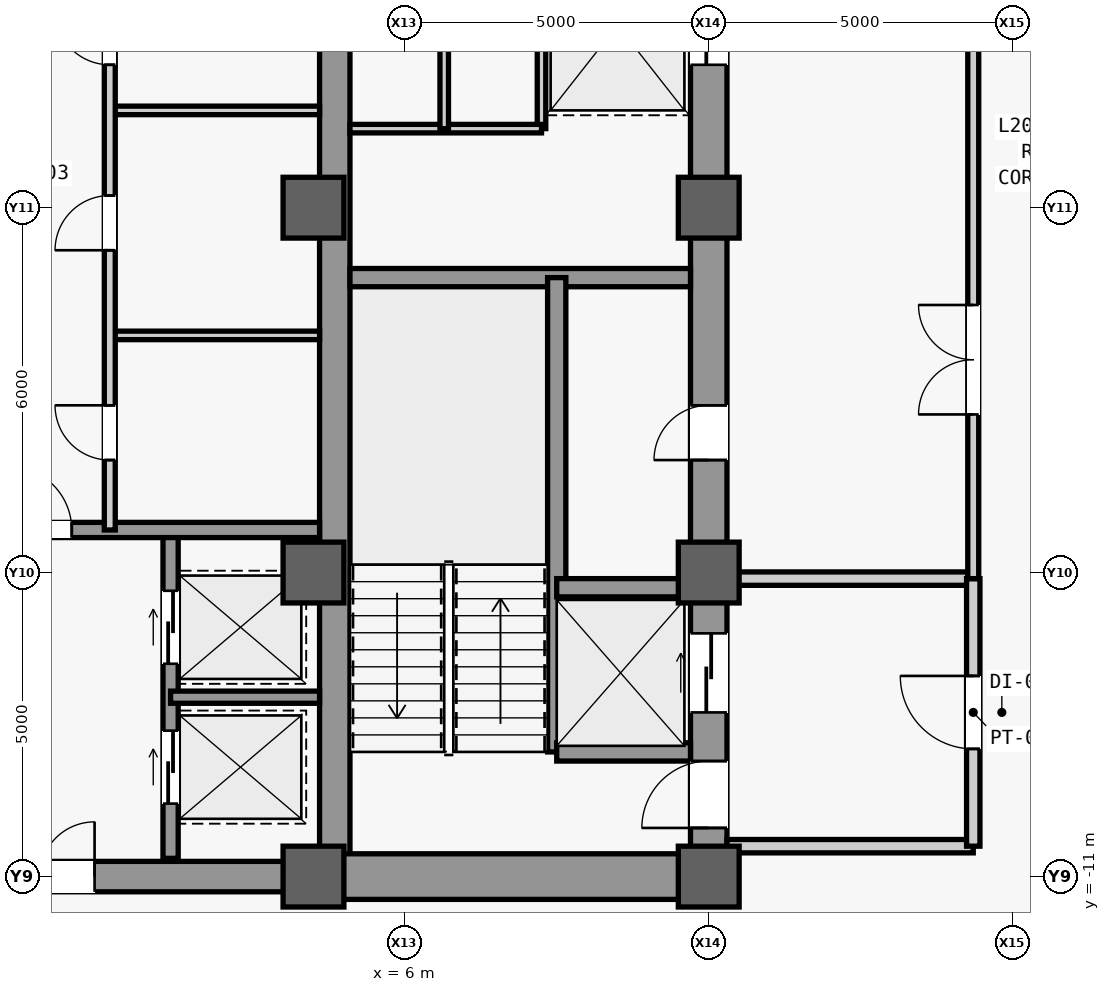
"""IFC4 building model, lengths in metres.
Left out: names, types, materials, properties, quantities, classifications, styles, units other than length and angle.
Written with IfcOpenShell. Run it as: python <this file> out.ifc"""

import sys

from ifc_helpers import new_model, si_unit, direction, frame, frame_2d, origin, origin_2d, place, context, subcontext, project, spatial, rectangle, extrude, source, transform, mapped, element, fill, save


model = new_model("IFC4")
c1 = context("Model", 3, precision=1e-05, world=origin(), true_north=direction((0.0, 1.0)))
c2 = subcontext(c1, "Body", "Model", "MODEL_VIEW")
j1 = project(units=[si_unit("LENGTHUNIT", "METRE"), si_unit("PLANEANGLEUNIT", "RADIAN")], contexts=[c1])
p1 = place(None, origin())
s1 = spatial("IfcSite", under=j1, at=p1, CompositionType="ELEMENT")
p2 = place(p1, origin())
s2 = spatial("IfcBuilding", under=s1, at=p2, CompositionType="ELEMENT")
p3 = place(p2, frame((0.0, 0.0, 91.4)))
s3 = spatial("IfcBuildingStorey", under=s2, at=p3, CompositionType="ELEMENT", Elevation=91.4)
m1 = source(origin(), c2, "Body", "SweptSolid", [
    extrude(rectangle(XDim=22.0, YDim=0.6, at=frame_2d((11.0, 0.0))), origin(), (0.0, 0.0, 1.0), 3.84),
])
p4 = place(p3, frame((11.0, -11.0, 0.0), z_axis=(0.0, 0.0, 1.0), x_axis=(0.0, 1.0, 0.0)))
e1 = element("IfcWall", 1, at=p4, inside=s3, PredefinedType="SHEAR", context=c2, shape_type="MappedRepresentation", body=[
    mapped(m1, transform((0.0, 0.0, 0.0), scale=1.0)),
])
m2 = source(origin(), c2, "Body", "SweptSolid", [
    extrude(rectangle(XDim=1.1, YDim=2.2, at=frame_2d((0.55, 1.1))), frame((0.0, 0.31, 0.0), z_axis=(0.0, -1.0, 0.0), x_axis=(1.0, 0.0, 0.0)), (0.0, 0.0, 1.0), 0.62),
])
p5 = place(p4, frame((0.8, 0.0, 0.0)))
e2 = element("IfcOpeningElement", 2, at=p5, cuts=e1, PredefinedType="OPENING", context=c2, shape_type="MappedRepresentation", body=[
    mapped(m2, transform((0.0, 0.0, 0.0), scale=1.0)),
])
m3 = source(origin(), c2, "Body", "SweptSolid", [
    extrude(rectangle(XDim=0.9, YDim=2.15, at=frame_2d((0.45, 1.075))), frame((0.0, 0.31, 0.0), z_axis=(0.0, -1.0, 0.0), x_axis=(1.0, 0.0, 0.0)), (0.0, 0.0, 1.0), 0.62),
])
p6 = place(p4, frame((6.85, 0.0, 0.0)))
e3 = element("IfcOpeningElement", 3, at=p6, cuts=e1, PredefinedType="OPENING", context=c2, shape_type="MappedRepresentation", body=[
    mapped(m3, transform((0.0, 0.0, 0.0), scale=1.0)),
])
m4 = source(origin(), c2, "Body", "SweptSolid", [
    extrude(rectangle(XDim=1.3, YDim=2.3, at=frame_2d((0.65, 1.15))), frame((0.0, 0.31, 0.0), z_axis=(0.0, -1.0, 0.0), x_axis=(1.0, 0.0, 0.0)), (0.0, 0.0, 1.0), 0.62),
])
p7 = place(p4, frame((2.7, 0.0, 0.0)))
e4 = element("IfcOpeningElement", 4, at=p7, cuts=e1, PredefinedType="OPENING", context=c2, shape_type="MappedRepresentation", body=[
    mapped(m4, transform((0.0, 0.0, 0.0), scale=1.0)),
])
p8 = place(p4, frame((13.35, 0.0, 0.0)))
e5 = element("IfcOpeningElement", 5, at=p8, cuts=e1, PredefinedType="OPENING", context=c2, shape_type="MappedRepresentation", body=[
    mapped(m4, transform((0.0, 0.0, 0.0), scale=1.0)),
])
m5 = source(origin(), c2, "Body", "SweptSolid", [
    extrude(rectangle(XDim=21.4, YDim=0.5, at=frame_2d((10.7, 0.0))), origin(), (0.0, 0.0, 1.0), 3.84),
])
p9 = place(p3, frame((4.85, -10.7, 0.0), z_axis=(0.0, 0.0, 1.0), x_axis=(0.0, 1.0, 0.0)))
e6 = element("IfcWall", 6, at=p9, inside=s3, PredefinedType="SHEAR", context=c2, shape_type="MappedRepresentation", body=[
    mapped(m5, transform((0.0, 0.0, 0.0), scale=1.0)),
])
m6 = source(origin(), c2, "Body", "SweptSolid", [
    extrude(rectangle(XDim=5.85, YDim=0.75, at=frame_2d((2.925, 0.0))), origin(), (0.0, 0.0, 1.0), 3.84),
])
p10 = place(p3, frame((4.85, -11.0, 0.0), z_axis=(0.0, 0.0, 1.0), x_axis=(1.0, 0.0, 0.0)))
e7 = element("IfcWall", 7, at=p10, inside=s3, PredefinedType="SHEAR", context=c2, shape_type="MappedRepresentation", body=[
    mapped(m6, transform((0.0, 0.0, 0.0), scale=1.0)),
])
m7 = source(origin(), c2, "Body", "SweptSolid", [
    extrude(rectangle(XDim=5.6, YDim=0.3, at=frame_2d((2.8, 0.0))), origin(), (0.0, 0.0, 1.0), 3.84),
])
p11 = place(p3, frame((5.1, -1.15, 0.0), z_axis=(0.0, 0.0, 1.0), x_axis=(1.0, 0.0, 0.0)))
e8 = element("IfcWall", 8, at=p11, inside=s3, PredefinedType="SHEAR", context=c2, shape_type="MappedRepresentation", body=[
    mapped(m7, transform((0.0, 0.0, 0.0), scale=1.0)),
])
m8 = source(origin(), c2, "Body", "SweptSolid", [
    extrude(rectangle(XDim=9.2, YDim=0.5, at=frame_2d((4.6, 0.0))), origin(), (0.0, 0.0, 1.0), 3.84),
])
p12 = place(p3, frame((-4.6, -11.0, 0.0), z_axis=(0.0, 0.0, 1.0), x_axis=(1.0, 0.0, 0.0)))
e9 = element("IfcWall", 9, at=p12, inside=s3, PredefinedType="SHEAR", context=c2, shape_type="MappedRepresentation", body=[
    mapped(m8, transform((0.0, 0.0, 0.0), scale=1.0)),
])
m9 = source(origin(), c2, "Body", "SweptSolid", [
    extrude(rectangle(XDim=1.8, YDim=2.25, at=frame_2d((0.9, 1.125))), frame((0.0, 0.26, 0.0), z_axis=(0.0, -1.0, 0.0), x_axis=(1.0, 0.0, 0.0)), (0.0, 0.0, 1.0), 0.52),
])
p13 = place(p12, frame((3.7, 0.0, 0.0)))
e10 = element("IfcOpeningElement", 10, at=p13, cuts=e9, PredefinedType="OPENING", context=c2, shape_type="MappedRepresentation", body=[
    mapped(m9, transform((0.0, 0.0, 0.0), scale=1.0)),
])
m10 = source(origin(), c2, "Body", "SweptSolid", [
    extrude(rectangle(XDim=1.0, YDim=1.0, at=origin_2d()), origin(), (0.0, 0.0, 1.0), 4.1),
])
for number, where, z_axis, x_axis in (
    (11, (4.5, -11.0, 0.0), (0.0, 0.0, 1.0), (1.0, 0.0, 0.0)),
    (12, (4.5, -6.0, 0.0), (0.0, 0.0, 1.0), (1.0, 0.0, 0.0)),
    (13, (4.5, 0.0, 0.0), (0.0, 0.0, 1.0), (1.0, 0.0, 0.0)),
    (14, (11.0, -11.0, 0.0), (0.0, 0.0, 1.0), (1.0, 0.0, 0.0)),
    (15, (11.0, -6.0, 0.0), (0.0, 0.0, 1.0), (1.0, 0.0, 0.0)),
    (16, (11.0, 0.0, 0.0), (0.0, 0.0, 1.0), (1.0, 0.0, 0.0)),
):
    element("IfcColumn", number, at=place(p3, frame(where, z_axis=z_axis, x_axis=x_axis)), inside=s3, PredefinedType="COLUMN", context=c2, shape_type="MappedRepresentation", body=[
        mapped(m10, transform((0.0, 0.0, 0.0), scale=1.0)),
    ])
m11 = source(origin(), c2, "Body", "SweptSolid", [
    extrude(rectangle(XDim=7.8, YDim=0.3, at=frame_2d((3.9, 0.0))), origin(), (0.0, 0.0, 1.0), 3.84),
])
p14 = place(p3, frame((8.5, -8.95, 0.0), z_axis=(0.0, 0.0, 1.0), x_axis=(0.0, 1.0, 0.0)))
e17 = element("IfcWall", 17, at=p14, inside=s3, PredefinedType="SHEAR", context=c2, shape_type="MappedRepresentation", body=[
    mapped(m11, transform((0.0, 0.0, 0.0), scale=1.0)),
])
m12 = source(origin(), c2, "Body", "SweptSolid", [
    extrude(rectangle(XDim=2.2, YDim=0.3, at=frame_2d((1.1, 0.0))), origin(), (0.0, 0.0, 1.0), 3.84),
])
for number, where, z_axis, x_axis in (
    (18, (8.5, -8.95, 0.0), (0.0, 0.0, 1.0), (1.0, 0.0, 0.0)),
    (19, (8.5, -6.25, 0.0), (0.0, 0.0, 1.0), (1.0, 0.0, 0.0)),
):
    element("IfcWall", number, at=place(p3, frame(where, z_axis=z_axis, x_axis=x_axis)), inside=s3, PredefinedType="SHEAR", context=c2, shape_type="MappedRepresentation", body=[
        mapped(m12, transform((0.0, 0.0, 0.0), scale=1.0)),
    ])
m13 = source(origin(), c2, "Body", "SweptSolid", [
    extrude(rectangle(XDim=9.4, YDim=0.14, at=frame_2d((4.7, 0.0))), origin(), (0.0, 0.0, 1.0), 3.84),
])
p15 = place(p3, frame((8.25, 1.3, 0.0), z_axis=(0.0, 0.0, 1.0), x_axis=(0.0, 1.0, 0.0)))
e20 = element("IfcWall", 20, at=p15, inside=s3, PredefinedType="PARTITIONING", context=c2, shape_type="MappedRepresentation", body=[
    mapped(m13, transform((0.0, 0.0, 0.0), scale=1.0)),
])
m14 = source(origin(), c2, "Body", "SweptSolid", [
    extrude(rectangle(XDim=3.15, YDim=0.14, at=frame_2d((1.575, 0.0))), origin(), (0.0, 0.0, 1.0), 3.84),
])
p16 = place(p3, frame((5.1, 1.3, 0.0), z_axis=(0.0, 0.0, 1.0), x_axis=(1.0, 0.0, 0.0)))
e21 = element("IfcWall", 21, at=p16, inside=s3, PredefinedType="PARTITIONING", context=c2, shape_type="MappedRepresentation", body=[
    mapped(m14, transform((0.0, 0.0, 0.0), scale=1.0)),
])
m15 = source(origin(), c2, "Body", "SweptSolid", [
    extrude(rectangle(XDim=7.1, YDim=0.14, at=frame_2d((3.55, 0.0))), origin(), (0.0, 0.0, 1.0), 3.84),
])
p17 = place(p3, frame((6.65, 1.3, 0.0), z_axis=(0.0, 0.0, 1.0), x_axis=(0.0, 1.0, 0.0)))
e22 = element("IfcWall", 22, at=p17, inside=s3, PredefinedType="PARTITIONING", context=c2, shape_type="MappedRepresentation", body=[
    mapped(m15, transform((0.0, 0.0, 0.0), scale=1.0)),
])
m16 = source(origin(), c2, "Body", "SweptSolid", [
    extrude(rectangle(XDim=0.9, YDim=2.15, at=frame_2d((0.45, 1.075))), frame((0.0, 0.08, 0.0), z_axis=(0.0, -1.0, 0.0), x_axis=(1.0, 0.0, 0.0)), (0.0, 0.0, 1.0), 0.16),
])
p18 = place(p17, frame((1.3, 0.0, 0.0)))
e23 = element("IfcOpeningElement", 23, at=p18, cuts=e22, PredefinedType="OPENING", context=c2, shape_type="MappedRepresentation", body=[
    mapped(m16, transform((0.0, 0.0, 0.0), scale=1.0)),
])
m17 = source(origin(), c2, "Body", "SweptSolid", [
    extrude(rectangle(XDim=4.05, YDim=0.22, at=frame_2d((2.025, 0.0))), origin(), (0.0, 0.0, 1.0), 3.84),
])
p19 = place(p3, frame((11.3, -10.5, 0.0), z_axis=(0.0, 0.0, 1.0), x_axis=(1.0, 0.0, 0.0)))
e24 = element("IfcWall", 24, at=p19, inside=s3, PredefinedType="PARTITIONING", context=c2, shape_type="MappedRepresentation", body=[
    mapped(m17, transform((0.0, 0.0, 0.0), scale=1.0)),
])
m18 = source(origin(), c2, "Body", "SweptSolid", [
    extrude(rectangle(XDim=4.05, YDim=0.22, at=frame_2d((2.025, 0.0))), origin(), (0.0, 0.0, 1.0), 3.067),
])
p20 = place(p3, frame((11.3, -6.1, 0.0), z_axis=(0.0, 0.0, 1.0), x_axis=(1.0, 0.0, 0.0)))
e25 = element("IfcWall", 25, at=p20, inside=s3, PredefinedType="PARTITIONING", context=c2, shape_type="MappedRepresentation", body=[
    mapped(m18, transform((0.0, 0.0, 0.0), scale=1.0)),
])
m19 = source(origin(), c2, "Body", "SweptSolid", [
    extrude(rectangle(XDim=4.4, YDim=0.22, at=frame_2d((2.2, 0.0))), origin(), (0.0, 0.0, 1.0), 3.84),
])
p21 = place(p3, frame((15.35, -10.5, 0.0), z_axis=(0.0, 0.0, 1.0), x_axis=(0.0, 1.0, 0.0)))
e26 = element("IfcWall", 26, at=p21, inside=s3, PredefinedType="PARTITIONING", context=c2, shape_type="MappedRepresentation", body=[
    mapped(m19, transform((0.0, 0.0, 0.0), scale=1.0)),
])
m20 = source(origin(), c2, "Body", "SweptSolid", [
    extrude(rectangle(XDim=1.2, YDim=2.2, at=frame_2d((0.6, 1.1))), frame((0.0, 0.12, 0.0), z_axis=(0.0, -1.0, 0.0), x_axis=(1.0, 0.0, 0.0)), (0.0, 0.0, 1.0), 0.24),
])
p22 = place(p21, frame((1.6, 0.0, 0.0)))
e27 = element("IfcOpeningElement", 27, at=p22, cuts=e26, PredefinedType="OPENING", context=c2, shape_type="MappedRepresentation", body=[
    mapped(m20, transform((0.0, 0.0, 0.0), scale=1.0)),
])
m21 = source(origin(), c2, "Body", "SweptSolid", [
    extrude(rectangle(XDim=16.6, YDim=0.18, at=frame_2d((8.3, 0.0))), origin(), (0.0, 0.0, 1.0), 3.84),
])
p23 = place(p3, frame((15.35, -6.1, 0.0), z_axis=(0.0, 0.0, 1.0), x_axis=(0.0, 1.0, 0.0)))
e28 = element("IfcWall", 28, at=p23, inside=s3, PredefinedType="PARTITIONING", context=c2, shape_type="MappedRepresentation", body=[
    mapped(m21, transform((0.0, 0.0, 0.0), scale=1.0)),
])
m22 = source(origin(), c2, "Body", "SweptSolid", [
    extrude(rectangle(XDim=1.8, YDim=2.25, at=frame_2d((0.9, 1.125))), frame((0.0, 0.1, 0.0), z_axis=(0.0, -1.0, 0.0), x_axis=(1.0, 0.0, 0.0)), (0.0, 0.0, 1.0), 0.2),
])
p24 = place(p23, frame((2.7, 0.0, 0.0)))
e29 = element("IfcOpeningElement", 29, at=p24, cuts=e28, PredefinedType="OPENING", context=c2, shape_type="MappedRepresentation", body=[
    mapped(m22, transform((0.0, 0.0, 0.0), scale=1.0)),
])
p25 = place(p23, frame((13.0, 0.0, 0.0)))
e30 = element("IfcOpeningElement", 30, at=p25, cuts=e28, PredefinedType="OPENING", context=c2, shape_type="MappedRepresentation", body=[
    mapped(m22, transform((0.0, 0.0, 0.0), scale=1.0)),
])
m23 = source(origin(), c2, "Body", "SweptSolid", [
    extrude(rectangle(XDim=5.4, YDim=0.25, at=frame_2d((2.7, 0.0))), origin(), (0.0, 0.0, 1.0), 3.84),
])
p26 = place(p3, frame((2.15, -10.7, 0.0), z_axis=(0.0, 0.0, 1.0), x_axis=(0.0, 1.0, 0.0)))
e31 = element("IfcWall", 31, at=p26, inside=s3, PredefinedType="SHEAR", context=c2, shape_type="MappedRepresentation", body=[
    mapped(m23, transform((0.0, 0.0, 0.0), scale=1.0)),
])
m24 = source(origin(), c2, "Body", "SweptSolid", [
    extrude(rectangle(XDim=1.2, YDim=2.3, at=frame_2d((0.6, 1.15))), frame((0.0, 0.135, 0.0), z_axis=(0.0, -1.0, 0.0), x_axis=(1.0, 0.0, 0.0)), (0.0, 0.0, 1.0), 0.27),
])
p27 = place(p26, frame((0.9, 0.0, 0.0)))
e32 = element("IfcOpeningElement", 32, at=p27, cuts=e31, PredefinedType="OPENING", context=c2, shape_type="MappedRepresentation", body=[
    mapped(m24, transform((0.0, 0.0, 0.0), scale=1.0)),
])
p28 = place(p26, frame((3.2, 0.0, 0.0)))
e33 = element("IfcOpeningElement", 33, at=p28, cuts=e31, PredefinedType="OPENING", context=c2, shape_type="MappedRepresentation", body=[
    mapped(m24, transform((0.0, 0.0, 0.0), scale=1.0)),
])
m25 = source(origin(), c2, "Body", "SweptSolid", [
    extrude(rectangle(XDim=2.45, YDim=0.2, at=frame_2d((1.225, 0.0))), origin(), (0.0, 0.0, 1.0), 3.84),
])
p29 = place(p3, frame((2.15, -8.05, 0.0), z_axis=(0.0, 0.0, 1.0), x_axis=(1.0, 0.0, 0.0)))
e34 = element("IfcWall", 34, at=p29, inside=s3, PredefinedType="SHEAR", context=c2, shape_type="MappedRepresentation", body=[
    mapped(m25, transform((0.0, 0.0, 0.0), scale=1.0)),
])
m26 = source(origin(), c2, "Body", "SweptSolid", [
    extrude(rectangle(XDim=9.2, YDim=0.25, at=frame_2d((4.6, 0.0))), origin(), (0.0, 0.0, 1.0), 3.84),
])
p30 = place(p3, frame((-4.6, -5.3, 0.0), z_axis=(0.0, 0.0, 1.0), x_axis=(1.0, 0.0, 0.0)))
e35 = element("IfcWall", 35, at=p30, inside=s3, PredefinedType="SHEAR", context=c2, shape_type="MappedRepresentation", body=[
    mapped(m26, transform((0.0, 0.0, 0.0), scale=1.0)),
])
m27 = source(origin(), c2, "Body", "SweptSolid", [
    extrude(rectangle(XDim=1.05, YDim=2.2, at=frame_2d((0.525, 1.1))), frame((0.0, 0.135, 0.0), z_axis=(0.0, -1.0, 0.0), x_axis=(1.0, 0.0, 0.0)), (0.0, 0.0, 1.0), 0.27),
])
p31 = place(p30, frame((4.075, 0.0, 0.0)))
e36 = element("IfcOpeningElement", 36, at=p31, cuts=e35, PredefinedType="OPENING", context=c2, shape_type="MappedRepresentation", body=[
    mapped(m27, transform((0.0, 0.0, 0.0), scale=1.0)),
])
m28 = source(origin(), c2, "Body", "SweptSolid", [
    extrude(rectangle(XDim=3.45, YDim=0.14, at=frame_2d((1.725, 0.0))), origin(), (0.0, 0.0, 1.0), 3.84),
])
for number, where, z_axis, x_axis in (
    (37, (1.15, -2.1, 0.0), (0.0, 0.0, 1.0), (1.0, 0.0, 0.0)),
    (38, (1.15, 1.6, 0.0), (0.0, 0.0, 1.0), (1.0, 0.0, 0.0)),
):
    element("IfcWall", number, at=place(p3, frame(where, z_axis=z_axis, x_axis=x_axis)), inside=s3, PredefinedType="PARTITIONING", context=c2, shape_type="MappedRepresentation", body=[
        mapped(m28, transform((0.0, 0.0, 0.0), scale=1.0)),
    ])
m29 = source(origin(), c2, "Body", "SweptSolid", [
    extrude(rectangle(XDim=10.6, YDim=0.18, at=frame_2d((5.3, 0.0))), origin(), (0.0, 0.0, 1.0), 3.84),
])
p32 = place(p3, frame((1.15, -5.3, 0.0), z_axis=(0.0, 0.0, 1.0), x_axis=(0.0, 1.0, 0.0)))
e39 = element("IfcWall", 39, at=p32, inside=s3, PredefinedType="PARTITIONING", context=c2, shape_type="MappedRepresentation", body=[
    mapped(m29, transform((0.0, 0.0, 0.0), scale=1.0)),
])
m30 = source(origin(), c2, "Body", "SweptSolid", [
    extrude(rectangle(XDim=0.9, YDim=2.15, at=frame_2d((0.45, 1.075))), frame((0.0, 0.1, 0.0), z_axis=(0.0, -1.0, 0.0), x_axis=(1.0, 0.0, 0.0)), (0.0, 0.0, 1.0), 0.2),
])
p33 = place(p32, frame((1.15, 0.0, 0.0)))
e40 = element("IfcOpeningElement", 40, at=p33, cuts=e39, PredefinedType="OPENING", context=c2, shape_type="MappedRepresentation", body=[
    mapped(m30, transform((0.0, 0.0, 0.0), scale=1.0)),
])
p34 = place(p32, frame((4.6, 0.0, 0.0)))
e41 = element("IfcOpeningElement", 41, at=p34, cuts=e39, PredefinedType="OPENING", context=c2, shape_type="MappedRepresentation", body=[
    mapped(m30, transform((0.0, 0.0, 0.0), scale=1.0)),
])
p35 = place(p32, frame((7.65, 0.0, 0.0)))
e42 = element("IfcOpeningElement", 42, at=p35, cuts=e39, PredefinedType="OPENING", context=c2, shape_type="MappedRepresentation", body=[
    mapped(m30, transform((0.0, 0.0, 0.0), scale=1.0)),
])
p36 = place(p32, frame((9.475, 0.0, 0.0)))
e43 = element("IfcOpeningElement", 43, at=p36, cuts=e39, PredefinedType="OPENING", context=c2, shape_type="MappedRepresentation", body=[
    mapped(m30, transform((0.0, 0.0, 0.0), scale=1.0)),
])
m31 = source(origin(), c2, "Body", "SweptSolid", [
    extrude(rectangle(XDim=1.1, YDim=2.2, at=frame_2d((0.55, 1.1))), frame((0.0, 0.025, 0.0), z_axis=(0.0, -1.0, 0.0), x_axis=(1.0, 0.0, 0.0)), (0.0, 0.0, 1.0), 0.05),
])
p37 = place(p5, origin())
e44 = element("IfcDoor", 44, at=p37, inside=s3, OperationType="SINGLE_SWING_LEFT", PredefinedType="DOOR", context=c2, shape_type="MappedRepresentation", body=[
    mapped(m31, transform((0.0, 0.0, 0.0), scale=1.0)),
])
fill(e2, e44)
m32 = source(origin(), c2, "Body", "SweptSolid", [
    extrude(rectangle(XDim=0.9, YDim=2.15, at=frame_2d((0.45, 1.075))), frame((0.0, 0.025, 0.0), z_axis=(0.0, -1.0, 0.0), x_axis=(1.0, 0.0, 0.0)), (0.0, 0.0, 1.0), 0.05),
])
p38 = place(p6, origin())
e45 = element("IfcDoor", 45, at=p38, inside=s3, OperationType="SINGLE_SWING_LEFT", PredefinedType="DOOR", context=c2, shape_type="MappedRepresentation", body=[
    mapped(m32, transform((0.0, 0.0, 0.0), scale=1.0)),
])
fill(e3, e45)
m33 = source(origin(), c2, "Body", "SweptSolid", [
    extrude(rectangle(XDim=1.2, YDim=2.2, at=frame_2d((0.6, 1.1))), frame((0.0, 0.025, 0.0), z_axis=(0.0, -1.0, 0.0), x_axis=(1.0, 0.0, 0.0)), (0.0, 0.0, 1.0), 0.05),
])
p39 = place(p22, origin())
e46 = element("IfcDoor", 46, at=p39, inside=s3, OperationType="SINGLE_SWING_RIGHT", PredefinedType="DOOR", context=c2, shape_type="MappedRepresentation", body=[
    mapped(m33, transform((0.0, 0.0, 0.0), scale=1.0)),
])
fill(e27, e46)
m34 = source(origin(), c2, "Body", "SweptSolid", [
    extrude(rectangle(XDim=1.8, YDim=2.25, at=frame_2d((0.9, 1.125))), frame((0.0, 0.025, 0.0), z_axis=(0.0, -1.0, 0.0), x_axis=(1.0, 0.0, 0.0)), (0.0, 0.0, 1.0), 0.05),
])
p40 = place(p24, origin())
e47 = element("IfcDoor", 47, at=p40, inside=s3, OperationType="SINGLE_SWING_RIGHT", PredefinedType="DOOR", context=c2, shape_type="MappedRepresentation", body=[
    mapped(m34, transform((0.0, 0.0, 0.0), scale=1.0)),
])
fill(e29, e47)
m35 = source(origin(), c2, "Body", "SweptSolid", [
    extrude(rectangle(XDim=1.05, YDim=2.2, at=frame_2d((0.525, 1.1))), frame((0.0, 0.025, 0.0), z_axis=(0.0, -1.0, 0.0), x_axis=(1.0, 0.0, 0.0)), (0.0, 0.0, 1.0), 0.05),
])
p41 = place(p31, origin())
e48 = element("IfcDoor", 48, at=p41, inside=s3, OperationType="SINGLE_SWING_LEFT", PredefinedType="DOOR", context=c2, shape_type="MappedRepresentation", body=[
    mapped(m35, transform((0.0, 0.0, 0.0), scale=1.0)),
])
fill(e36, e48)
p42 = place(p13, origin())
e49 = element("IfcDoor", 49, at=p42, inside=s3, OperationType="SINGLE_SWING_LEFT", PredefinedType="DOOR", context=c2, shape_type="MappedRepresentation", body=[
    mapped(m34, transform((0.0, 0.0, 0.0), scale=1.0)),
])
fill(e10, e49)
p43 = place(p33, origin())
e50 = element("IfcDoor", 50, at=p43, inside=s3, OperationType="SINGLE_SWING_RIGHT", PredefinedType="DOOR", context=c2, shape_type="MappedRepresentation", body=[
    mapped(m32, transform((0.0, 0.0, 0.0), scale=1.0)),
])
fill(e40, e50)
p44 = place(p34, origin())
e51 = element("IfcDoor", 51, at=p44, inside=s3, OperationType="SINGLE_SWING_LEFT", PredefinedType="DOOR", context=c2, shape_type="MappedRepresentation", body=[
    mapped(m32, transform((0.0, 0.0, 0.0), scale=1.0)),
])
fill(e41, e51)
p45 = place(p35, origin())
e52 = element("IfcDoor", 52, at=p45, inside=s3, OperationType="SINGLE_SWING_RIGHT", PredefinedType="DOOR", context=c2, shape_type="MappedRepresentation", body=[
    mapped(m32, transform((0.0, 0.0, 0.0), scale=1.0)),
])
fill(e42, e52)
m36 = source(origin(), c2, "Body", "SweptSolid", [
    extrude(rectangle(XDim=1.2, YDim=2.3, at=frame_2d((0.6, 1.15))), frame((0.0, 0.025, 0.0), z_axis=(0.0, -1.0, 0.0), x_axis=(1.0, 0.0, 0.0)), (0.0, 0.0, 1.0), 0.05),
])
p46 = place(p27, origin())
e53 = element("IfcDoor", 53, at=p46, inside=s3, OperationType="SLIDING_TO_LEFT", PredefinedType="DOOR", context=c2, shape_type="MappedRepresentation", body=[
    mapped(m36, transform((0.0, 0.0, 0.0), scale=1.0)),
])
fill(e32, e53)
p47 = place(p28, origin())
e54 = element("IfcDoor", 54, at=p47, inside=s3, OperationType="SLIDING_TO_LEFT", PredefinedType="DOOR", context=c2, shape_type="MappedRepresentation", body=[
    mapped(m36, transform((0.0, 0.0, 0.0), scale=1.0)),
])
fill(e33, e54)
m37 = source(origin(), c2, "Body", "SweptSolid", [
    extrude(rectangle(XDim=1.3, YDim=2.3, at=frame_2d((0.65, 1.15))), frame((0.0, 0.025, 0.0), z_axis=(0.0, -1.0, 0.0), x_axis=(1.0, 0.0, 0.0)), (0.0, 0.0, 1.0), 0.05),
])
p48 = place(p7, origin())
e55 = element("IfcDoor", 55, at=p48, inside=s3, OperationType="SLIDING_TO_LEFT", PredefinedType="DOOR", context=c2, shape_type="MappedRepresentation", body=[
    mapped(m37, transform((0.0, 0.0, 0.0), scale=1.0)),
])
fill(e4, e55)
p49 = place(p8, origin())
e56 = element("IfcDoor", 56, at=p49, inside=s3, OperationType="SLIDING_TO_LEFT", PredefinedType="DOOR", context=c2, shape_type="MappedRepresentation", body=[
    mapped(m37, transform((0.0, 0.0, 0.0), scale=1.0)),
])
fill(e5, e56)
save(model, sys.argv[1])
